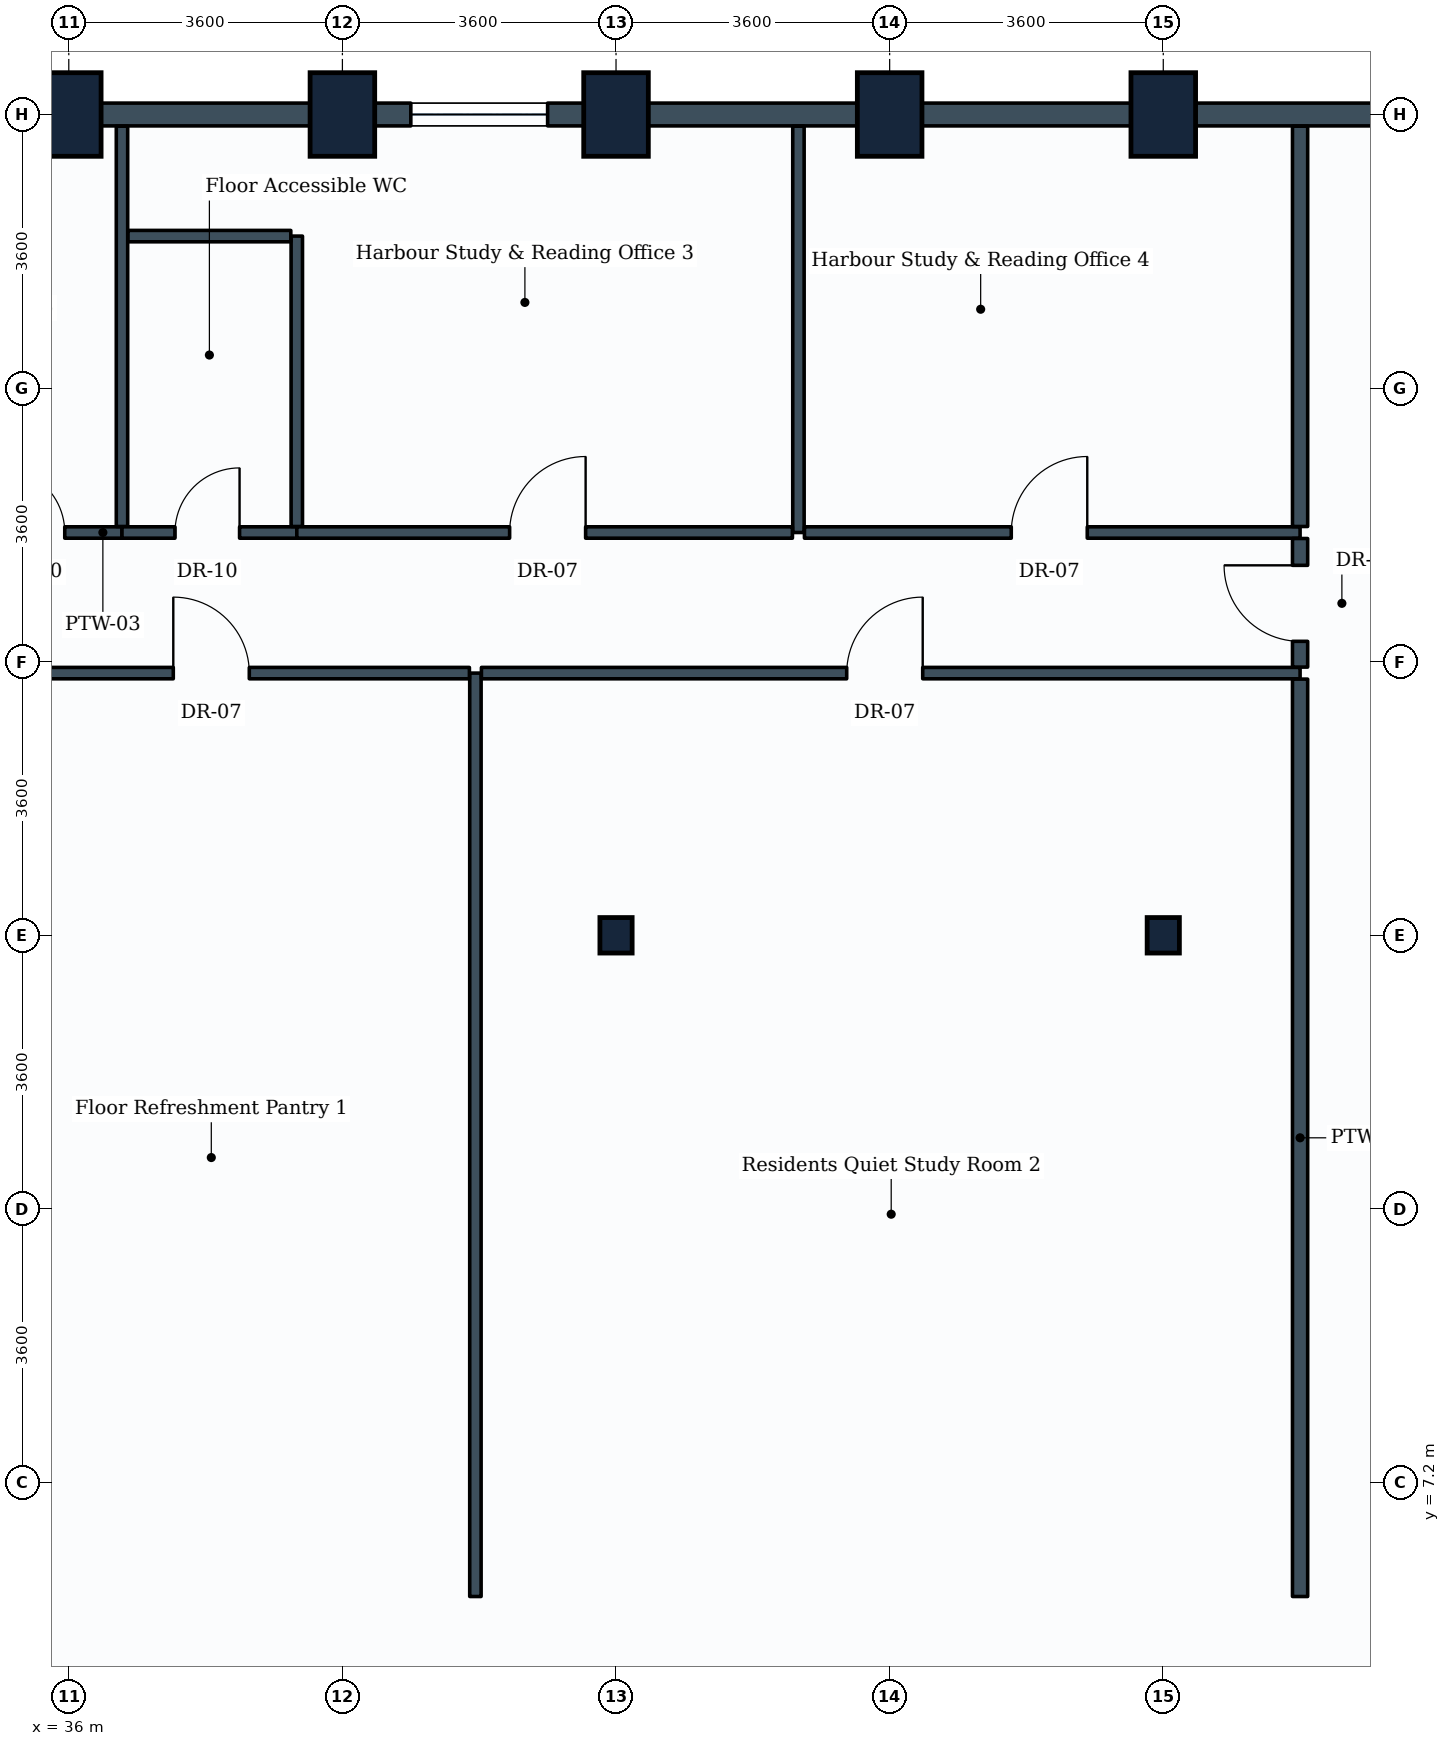
"""IFC4 building model, lengths in metres.
Left out: names, types, materials, properties, quantities, classifications, styles, units other than length and angle.
Written with IfcOpenShell. Run it as: python <this file> out.ifc"""

import sys

from ifc_helpers import new_model, si_unit, direction, frame, frame_2d, origin, origin_2d, place, context, subcontext, project, spatial, rectangle, i_section, extrude, element, fill, save


model = new_model("IFC4")
c1 = context("Model", 3, precision=1e-05, world=origin(), true_north=direction((0.0, 1.0)))
c2 = subcontext(c1, "Body", "Model", "MODEL_VIEW")
j1 = project(units=[si_unit("LENGTHUNIT", "METRE"), si_unit("PLANEANGLEUNIT", "RADIAN")], contexts=[c1])
p1 = place(None, origin())
s1 = spatial("IfcSite", under=j1, at=p1, CompositionType="ELEMENT")
p2 = place(p1, origin())
s2 = spatial("IfcBuilding", under=s1, at=p2, CompositionType="ELEMENT")
p3 = place(p2, frame((0.0, 0.0, 95.7)))
s3 = spatial("IfcBuildingStorey", under=s2, at=p3, CompositionType="ELEMENT", Elevation=95.7)
for number, where, z_axis, x_axis in (
    (1, (36.0, 25.2, 0.0), (0.0, 0.0, 1.0), (1.0, 0.0, 0.0)),
    (2, (39.6, 25.2, 0.0), (0.0, 0.0, 1.0), (1.0, 0.0, 0.0)),
):
    element("IfcColumn", number, at=place(p3, frame(where, z_axis=z_axis, x_axis=x_axis)), inside=s3, PredefinedType="COLUMN", context=c2, shape_type="SweptSolid", body=[
        extrude(rectangle(XDim=0.85, YDim=1.1, at=origin_2d()), origin(), (0.0, 0.0, 1.0), 3.9),
    ])
p4 = place(p3, frame((43.2, 14.4, 0.0), z_axis=(0.0, 0.0, 1.0), x_axis=(1.0, 0.0, 0.0)))
e3 = element("IfcColumn", 3, at=p4, inside=s3, PredefinedType="COLUMN", context=c2, shape_type="SweptSolid", body=[
    extrude(i_section(OverallWidth=0.424, OverallDepth=0.467, WebThickness=0.033, FlangeThickness=0.053, FilletRadius=0.015, at=origin_2d()), origin(), (0.0, 0.0, 1.0), 3.9),
])
for number, where, z_axis, x_axis in (
    (4, (43.2, 25.2, 0.0), (0.0, 0.0, 1.0), (1.0, 0.0, 0.0)),
    (5, (46.8, 25.2, 0.0), (0.0, 0.0, 1.0), (1.0, 0.0, 0.0)),
):
    element("IfcColumn", number, at=place(p3, frame(where, z_axis=z_axis, x_axis=x_axis)), inside=s3, PredefinedType="COLUMN", context=c2, shape_type="SweptSolid", body=[
        extrude(rectangle(XDim=0.85, YDim=1.1, at=origin_2d()), origin(), (0.0, 0.0, 1.0), 3.9),
    ])
p5 = place(p3, frame((50.4, 14.4, 0.0), z_axis=(0.0, 0.0, 1.0), x_axis=(1.0, 0.0, 0.0)))
e6 = element("IfcColumn", 6, at=p5, inside=s3, PredefinedType="COLUMN", context=c2, shape_type="SweptSolid", body=[
    extrude(i_section(OverallWidth=0.424, OverallDepth=0.467, WebThickness=0.033, FlangeThickness=0.053, FilletRadius=0.015, at=origin_2d()), origin(), (0.0, 0.0, 1.0), 3.9),
])
p6 = place(p3, frame((50.4, 25.2, 0.0), z_axis=(0.0, 0.0, 1.0), x_axis=(1.0, 0.0, 0.0)))
e7 = element("IfcColumn", 7, at=p6, inside=s3, PredefinedType="COLUMN", context=c2, shape_type="SweptSolid", body=[
    extrude(rectangle(XDim=0.85, YDim=1.1, at=origin_2d()), origin(), (0.0, 0.0, 1.0), 3.9),
])
p7 = place(p3, frame((50.4, 25.2, 0.0), z_axis=(0.0, 0.0, 1.0), x_axis=(1.0, 0.0, 0.0)))
e8 = element("IfcWall", 8, at=p7, inside=s3, PredefinedType="STANDARD", context=c2, shape_type="SweptSolid", body=[
    extrude(rectangle(XDim=3.6, YDim=0.3, at=frame_2d((1.8, 0.0))), origin(), (0.0, 0.0, 1.0), 2.93),
])
p8 = place(p3, frame((46.8, 25.2, 0.0), z_axis=(0.0, 0.0, 1.0), x_axis=(1.0, 0.0, 0.0)))
e9 = element("IfcWall", 9, at=p8, inside=s3, PredefinedType="STANDARD", context=c2, shape_type="SweptSolid", body=[
    extrude(rectangle(XDim=3.6, YDim=0.3, at=frame_2d((1.8, 0.0))), origin(), (0.0, 0.0, 1.0), 2.93),
])
p9 = place(p3, frame((43.2, 25.2, 0.0), z_axis=(0.0, 0.0, 1.0), x_axis=(1.0, 0.0, 0.0)))
e10 = element("IfcWall", 10, at=p9, inside=s3, PredefinedType="STANDARD", context=c2, shape_type="SweptSolid", body=[
    extrude(rectangle(XDim=3.6, YDim=0.3, at=frame_2d((1.8, 0.0))), origin(), (0.0, 0.0, 1.0), 2.93),
])
p10 = place(p3, frame((39.6, 25.2, 0.0), z_axis=(0.0, 0.0, 1.0), x_axis=(1.0, 0.0, 0.0)))
e11 = element("IfcWall", 11, at=p10, inside=s3, PredefinedType="STANDARD", context=c2, shape_type="SweptSolid", body=[
    extrude(rectangle(XDim=3.6, YDim=0.3, at=frame_2d((1.8, 0.0))), origin(), (0.0, 0.0, 1.0), 2.93),
])
p11 = place(p10, frame((0.9, 0.0, 0.85)))
e12 = element("IfcOpeningElement", 12, at=p11, cuts=e11, PredefinedType="OPENING", context=c2, shape_type="SweptSolid", body=[
    extrude(rectangle(XDim=1.8, YDim=1.35, at=frame_2d((0.9, 0.675))), frame((0.0, 0.16, 0.0), z_axis=(0.0, -1.0, 0.0), x_axis=(1.0, 0.0, 0.0)), (0.0, 0.0, 1.0), 0.32),
])
for number, where, z_axis, x_axis in (
    (13, (36.0, 25.2, 0.0), (0.0, 0.0, 1.0), (1.0, 0.0, 0.0)),
    (14, (32.4, 25.2, 0.0), (0.0, 0.0, 1.0), (1.0, 0.0, 0.0)),
):
    element("IfcWall", number, at=place(p3, frame(where, z_axis=z_axis, x_axis=x_axis)), inside=s3, PredefinedType="STANDARD", context=c2, shape_type="SweptSolid", body=[
        extrude(rectangle(XDim=3.6, YDim=0.3, at=frame_2d((1.8, 0.0))), origin(), (0.0, 0.0, 1.0), 2.93),
    ])
p12 = place(p3, frame((34.479, 19.7, 0.0), z_axis=(0.0, 0.0, 1.0), x_axis=(1.0, 0.0, 0.0)))
e15 = element("IfcWall", 15, at=p12, inside=s3, PredefinedType="PARTITIONING", context=c2, shape_type="SweptSolid", body=[
    extrude(rectangle(XDim=2.221, YDim=0.15, at=frame_2d((1.11, 0.0))), origin(), (0.0, 0.0, 1.0), 3.18),
])
p13 = place(p12, frame((0.618, 0.0, 0.0)))
e16 = element("IfcOpeningElement", 16, at=p13, cuts=e15, PredefinedType="OPENING", context=c2, shape_type="SweptSolid", body=[
    extrude(rectangle(XDim=0.85, YDim=2.1, at=frame_2d((0.425, 1.05))), frame((0.0, 0.085, 0.0), z_axis=(0.0, -1.0, 0.0), x_axis=(1.0, 0.0, 0.0)), (0.0, 0.0, 1.0), 0.17),
])
p14 = place(p3, frame((36.7, 19.779, 0.0), z_axis=(0.0, 0.0, 1.0), x_axis=(0.0, 1.0, 0.0)))
e17 = element("IfcWall", 17, at=p14, inside=s3, PredefinedType="PARTITIONING", context=c2, shape_type="SweptSolid", body=[
    extrude(rectangle(XDim=5.267, YDim=0.15, at=frame_2d((2.633, 0.0))), origin(), (0.0, 0.0, 1.0), 2.93),
])
p15 = place(p3, frame((36.7, 19.7, 0.0), z_axis=(0.0, 0.0, 1.0), x_axis=(1.0, 0.0, 0.0)))
e18 = element("IfcWall", 18, at=p15, inside=s3, PredefinedType="PARTITIONING", context=c2, shape_type="SweptSolid", body=[
    extrude(rectangle(XDim=2.3, YDim=0.15, at=frame_2d((1.15, 0.0))), origin(), (0.0, 0.0, 1.0), 3.635),
])
p16 = place(p15, frame((0.697, 0.0, 0.0)))
e19 = element("IfcOpeningElement", 19, at=p16, cuts=e18, PredefinedType="OPENING", context=c2, shape_type="SweptSolid", body=[
    extrude(rectangle(XDim=0.85, YDim=2.1, at=frame_2d((0.425, 1.05))), frame((0.0, 0.085, 0.0), z_axis=(0.0, -1.0, 0.0), x_axis=(1.0, 0.0, 0.0)), (0.0, 0.0, 1.0), 0.17),
])
p17 = place(p3, frame((39.0, 19.779, 0.0), z_axis=(0.0, 0.0, 1.0), x_axis=(0.0, 1.0, 0.0)))
e20 = element("IfcWall", 20, at=p17, inside=s3, PredefinedType="PARTITIONING", context=c2, shape_type="SweptSolid", body=[
    extrude(rectangle(XDim=3.821, YDim=0.15, at=frame_2d((1.911, 0.0))), origin(), (0.0, 0.0, 1.0), 3.18),
])
p18 = place(p3, frame((36.779, 23.6, 0.0), z_axis=(0.0, 0.0, 1.0), x_axis=(1.0, 0.0, 0.0)))
e21 = element("IfcWall", 21, at=p18, inside=s3, PredefinedType="PARTITIONING", context=c2, shape_type="SweptSolid", body=[
    extrude(rectangle(XDim=2.142, YDim=0.15, at=frame_2d((1.071, 0.0))), origin(), (0.0, 0.0, 1.0), 3.635),
])
p19 = place(p3, frame((41.35, 5.7, 0.0), z_axis=(0.0, 0.0, 1.0), x_axis=(0.0, 1.0, 0.0)))
e22 = element("IfcWall", 22, at=p19, inside=s3, PredefinedType="PARTITIONING", context=c2, shape_type="SweptSolid", body=[
    extrude(rectangle(XDim=12.15, YDim=0.15, at=frame_2d((6.075, 0.0))), origin(), (0.0, 0.0, 1.0), 3.18),
])
p20 = place(p3, frame((34.479, 17.85, 0.0), z_axis=(0.0, 0.0, 1.0), x_axis=(1.0, 0.0, 0.0)))
e23 = element("IfcWall", 23, at=p20, inside=s3, PredefinedType="PARTITIONING", context=c2, shape_type="SweptSolid", body=[
    extrude(rectangle(XDim=6.792, YDim=0.15, at=frame_2d((3.396, 0.0))), origin(), (0.0, 0.0, 1.0), 3.18),
])
p21 = place(p20, frame((2.896, 0.0, 0.0)))
e24 = element("IfcOpeningElement", 24, at=p21, cuts=e23, PredefinedType="OPENING", context=c2, shape_type="SweptSolid", body=[
    extrude(rectangle(XDim=1.0, YDim=2.1, at=frame_2d((0.5, 1.05))), frame((0.0, 0.085, 0.0), z_axis=(0.0, -1.0, 0.0), x_axis=(1.0, 0.0, 0.0)), (0.0, 0.0, 1.0), 0.17),
])
p22 = place(p3, frame((41.429, 17.85, 0.0), z_axis=(0.0, 0.0, 1.0), x_axis=(1.0, 0.0, 0.0)))
e25 = element("IfcWall", 25, at=p22, inside=s3, PredefinedType="PARTITIONING", context=c2, shape_type="SweptSolid", body=[
    extrude(rectangle(XDim=10.771, YDim=0.15, at=frame_2d((5.385, 0.0))), origin(), (0.0, 0.0, 1.0), 3.18),
])
p23 = place(p22, frame((4.806, 0.0, 0.0)))
e26 = element("IfcOpeningElement", 26, at=p23, cuts=e25, PredefinedType="OPENING", context=c2, shape_type="SweptSolid", body=[
    extrude(rectangle(XDim=1.0, YDim=2.1, at=frame_2d((0.5, 1.05))), frame((0.0, 0.085, 0.0), z_axis=(0.0, -1.0, 0.0), x_axis=(1.0, 0.0, 0.0)), (0.0, 0.0, 1.0), 0.17),
])
p24 = place(p3, frame((45.6, 19.7, 0.0), z_axis=(0.0, 0.0, 1.0), x_axis=(0.0, 1.0, 0.0)))
e27 = element("IfcWall", 27, at=p24, inside=s3, PredefinedType="PARTITIONING", context=c2, shape_type="SweptSolid", body=[
    extrude(rectangle(XDim=5.346, YDim=0.15, at=frame_2d((2.673, 0.0))), origin(), (0.0, 0.0, 1.0), 2.93),
])
p25 = place(p3, frame((39.0, 19.7, 0.0), z_axis=(0.0, 0.0, 1.0), x_axis=(1.0, 0.0, 0.0)))
e28 = element("IfcWall", 28, at=p25, inside=s3, PredefinedType="PARTITIONING", context=c2, shape_type="SweptSolid", body=[
    extrude(rectangle(XDim=6.521, YDim=0.15, at=frame_2d((3.26, 0.0))), origin(), (0.0, 0.0, 1.0), 3.19),
])
p26 = place(p25, frame((2.8, 0.0, 0.0)))
e29 = element("IfcOpeningElement", 29, at=p26, cuts=e28, PredefinedType="OPENING", context=c2, shape_type="SweptSolid", body=[
    extrude(rectangle(XDim=1.0, YDim=2.1, at=frame_2d((0.5, 1.05))), frame((0.0, 0.085, 0.0), z_axis=(0.0, -1.0, 0.0), x_axis=(1.0, 0.0, 0.0)), (0.0, 0.0, 1.0), 0.17),
])
p27 = place(p3, frame((45.679, 19.7, 0.0), z_axis=(0.0, 0.0, 1.0), x_axis=(1.0, 0.0, 0.0)))
e30 = element("IfcWall", 30, at=p27, inside=s3, PredefinedType="PARTITIONING", context=c2, shape_type="SweptSolid", body=[
    extrude(rectangle(XDim=6.521, YDim=0.15, at=frame_2d((3.26, 0.0))), origin(), (0.0, 0.0, 1.0), 3.19),
])
p28 = place(p27, frame((2.721, 0.0, 0.0)))
e31 = element("IfcOpeningElement", 31, at=p28, cuts=e30, PredefinedType="OPENING", context=c2, shape_type="SweptSolid", body=[
    extrude(rectangle(XDim=1.0, YDim=2.1, at=frame_2d((0.5, 1.05))), frame((0.0, 0.085, 0.0), z_axis=(0.0, -1.0, 0.0), x_axis=(1.0, 0.0, 0.0)), (0.0, 0.0, 1.0), 0.17),
])
p29 = place(p3, frame((52.2, 5.7, 0.0), z_axis=(0.0, 0.0, 1.0), x_axis=(0.0, 1.0, 0.0)))
e32 = element("IfcWall", 32, at=p29, inside=s3, PredefinedType="PARTITIONING", context=c2, shape_type="SweptSolid", body=[
    extrude(rectangle(XDim=12.071, YDim=0.2, at=frame_2d((6.036, 0.0))), origin(), (0.0, 0.0, 1.0), 3.18),
])
p30 = place(p3, frame((52.2, 19.779, 0.0), z_axis=(0.0, 0.0, 1.0), x_axis=(0.0, 1.0, 0.0)))
e33 = element("IfcWall", 33, at=p30, inside=s3, PredefinedType="PARTITIONING", context=c2, shape_type="SweptSolid", body=[
    extrude(rectangle(XDim=5.267, YDim=0.2, at=frame_2d((2.633, 0.0))), origin(), (0.0, 0.0, 1.0), 2.93),
])
p31 = place(p3, frame((52.2, 17.929, 0.0), z_axis=(0.0, 0.0, 1.0), x_axis=(0.0, 1.0, 0.0)))
e34 = element("IfcWall", 34, at=p31, inside=s3, PredefinedType="PARTITIONING", context=c2, shape_type="SweptSolid", body=[
    extrude(rectangle(XDim=1.692, YDim=0.2, at=frame_2d((0.846, 0.0))), origin(), (0.0, 0.0, 1.0), 3.635),
])
p32 = place(p31, frame((0.339, 0.0, 0.0)))
e35 = element("IfcOpeningElement", 35, at=p32, cuts=e34, PredefinedType="OPENING", context=c2, shape_type="SweptSolid", body=[
    extrude(rectangle(XDim=1.0, YDim=2.1, at=frame_2d((0.5, 1.05))), frame((0.0, 0.11, 0.0), z_axis=(0.0, -1.0, 0.0), x_axis=(1.0, 0.0, 0.0)), (0.0, 0.0, 1.0), 0.22),
])
p33 = place(p11, origin())
e36 = element("IfcWindow", 36, at=p33, inside=s3, PartitioningType="SINGLE_PANEL", PredefinedType="WINDOW", context=c2, shape_type="SweptSolid", body=[
    extrude(rectangle(XDim=1.8, YDim=1.35, at=frame_2d((0.9, 0.675))), frame((0.0, 0.03, 0.0), z_axis=(0.0, -1.0, 0.0), x_axis=(1.0, 0.0, 0.0)), (0.0, 0.0, 1.0), 0.06),
])
fill(e12, e36)
p34 = place(p13, origin())
e37 = element("IfcDoor", 37, at=p34, inside=s3, OperationType="SINGLE_SWING_LEFT", PredefinedType="DOOR", context=c2, shape_type="SweptSolid", body=[
    extrude(rectangle(XDim=0.85, YDim=2.1, at=frame_2d((0.425, 1.05))), frame((0.0, 0.025, 0.0), z_axis=(0.0, -1.0, 0.0), x_axis=(1.0, 0.0, 0.0)), (0.0, 0.0, 1.0), 0.05),
])
fill(e16, e37)
p35 = place(p16, origin())
e38 = element("IfcDoor", 38, at=p35, inside=s3, OperationType="SINGLE_SWING_RIGHT", PredefinedType="DOOR", context=c2, shape_type="SweptSolid", body=[
    extrude(rectangle(XDim=0.85, YDim=2.1, at=frame_2d((0.425, 1.05))), frame((0.0, 0.025, 0.0), z_axis=(0.0, -1.0, 0.0), x_axis=(1.0, 0.0, 0.0)), (0.0, 0.0, 1.0), 0.05),
])
fill(e19, e38)
p36 = place(p21, origin())
e39 = element("IfcDoor", 39, at=p36, inside=s3, OperationType="SINGLE_SWING_LEFT", PredefinedType="DOOR", context=c2, shape_type="SweptSolid", body=[
    extrude(rectangle(XDim=1.0, YDim=2.1, at=frame_2d((0.5, 1.05))), frame((0.0, 0.025, 0.0), z_axis=(0.0, -1.0, 0.0), x_axis=(1.0, 0.0, 0.0)), (0.0, 0.0, 1.0), 0.05),
])
fill(e24, e39)
p37 = place(p23, origin())
e40 = element("IfcDoor", 40, at=p37, inside=s3, OperationType="SINGLE_SWING_RIGHT", PredefinedType="DOOR", context=c2, shape_type="SweptSolid", body=[
    extrude(rectangle(XDim=1.0, YDim=2.1, at=frame_2d((0.5, 1.05))), frame((0.0, 0.025, 0.0), z_axis=(0.0, -1.0, 0.0), x_axis=(1.0, 0.0, 0.0)), (0.0, 0.0, 1.0), 0.05),
])
fill(e26, e40)
p38 = place(p26, origin())
e41 = element("IfcDoor", 41, at=p38, inside=s3, OperationType="SINGLE_SWING_RIGHT", PredefinedType="DOOR", context=c2, shape_type="SweptSolid", body=[
    extrude(rectangle(XDim=1.0, YDim=2.1, at=frame_2d((0.5, 1.05))), frame((0.0, 0.025, 0.0), z_axis=(0.0, -1.0, 0.0), x_axis=(1.0, 0.0, 0.0)), (0.0, 0.0, 1.0), 0.05),
])
fill(e29, e41)
p39 = place(p28, origin())
e42 = element("IfcDoor", 42, at=p39, inside=s3, OperationType="SINGLE_SWING_RIGHT", PredefinedType="DOOR", context=c2, shape_type="SweptSolid", body=[
    extrude(rectangle(XDim=1.0, YDim=2.1, at=frame_2d((0.5, 1.05))), frame((0.0, 0.025, 0.0), z_axis=(0.0, -1.0, 0.0), x_axis=(1.0, 0.0, 0.0)), (0.0, 0.0, 1.0), 0.05),
])
fill(e31, e42)
p40 = place(p32, origin())
e43 = element("IfcDoor", 43, at=p40, inside=s3, OperationType="SINGLE_SWING_RIGHT", PredefinedType="DOOR", context=c2, shape_type="SweptSolid", body=[
    extrude(rectangle(XDim=1.0, YDim=2.1, at=frame_2d((0.5, 1.05))), frame((0.0, 0.025, 0.0), z_axis=(0.0, -1.0, 0.0), x_axis=(1.0, 0.0, 0.0)), (0.0, 0.0, 1.0), 0.05),
])
fill(e35, e43)
save(model, sys.argv[1])
